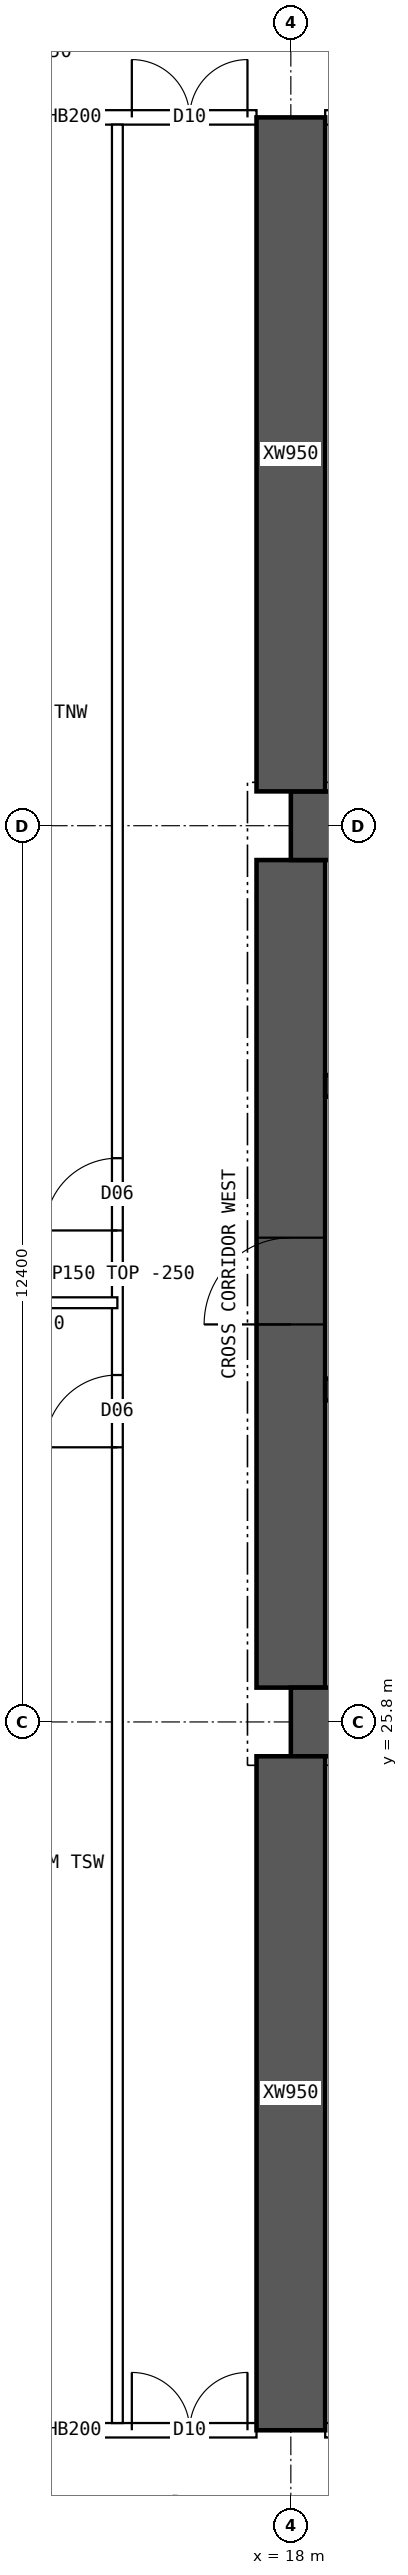
"""IFC4 building model, lengths in metres.
Left out: names, types, materials, properties, quantities, classifications, styles, units other than length and angle.
Written with IfcOpenShell. Run it as: python <this file> out.ifc"""

import sys

from ifc_helpers import new_model, si_unit, direction, frame, frame_2d, origin, place, context, subcontext, project, spatial, rectangle, extrude, element, fill, save


model = new_model("IFC4")
c1 = context("Model", 3, precision=1e-05, world=origin(), true_north=direction((0.0, 1.0)))
c2 = subcontext(c1, "Body", "Model", "MODEL_VIEW")
j1 = project(units=[si_unit("LENGTHUNIT", "METRE"), si_unit("PLANEANGLEUNIT", "RADIAN")], contexts=[c1])
p1 = place(None, origin())
s1 = spatial("IfcSite", under=j1, at=p1, CompositionType="ELEMENT")
p2 = place(p1, origin())
s2 = spatial("IfcBuilding", under=s1, at=p2, CompositionType="ELEMENT")
p3 = place(p2, frame((0.0, 0.0, 118.15)))
s3 = spatial("IfcBuildingStorey", under=s2, at=p3, CompositionType="ELEMENT", Elevation=118.15)
for number, where, z_axis, x_axis in (
    (1, (18.0, 25.8, 0.0), (0.0, 0.0, 1.0), (1.0, 0.0, 0.0)),
    (2, (18.0, 38.2, 0.0), (0.0, 0.0, 1.0), (1.0, 0.0, 0.0)),
):
    element("IfcWall", number, at=place(p3, frame(where, z_axis=z_axis, x_axis=x_axis)), inside=s3, PredefinedType="SHEAR", context=c2, shape_type="SweptSolid", body=[
        extrude(rectangle(XDim=48.0, YDim=0.95, at=frame_2d((24.0, 0.0))), origin(), (0.0, 0.0, 1.0), 3.75),
    ])
p4 = place(p3, frame((18.0, 26.275, 0.0), z_axis=(0.0, 0.0, 1.0), x_axis=(0.0, 1.0, 0.0)))
e3 = element("IfcWall", 3, at=p4, inside=s3, PredefinedType="SHEAR", context=c2, shape_type="SweptSolid", body=[
    extrude(rectangle(XDim=11.45, YDim=0.95, at=frame_2d((5.725, 0.0))), origin(), (0.0, 0.0, 1.0), 3.75),
])
p5 = place(p4, frame((5.025, 0.0, 0.0)))
e4 = element("IfcOpeningElement", 4, at=p5, cuts=e3, PredefinedType="OPENING", context=c2, shape_type="SweptSolid", body=[
    extrude(rectangle(XDim=1.2, YDim=2.1, at=frame_2d((0.6, 1.05))), frame((0.0, 0.485, 0.0), z_axis=(0.0, -1.0, 0.0), x_axis=(1.0, 0.0, 0.0)), (0.0, 0.0, 1.0), 0.97),
])
p6 = place(p3, frame((18.475, 30.4, 0.0), z_axis=(0.0, 0.0, 1.0), x_axis=(1.0, 0.0, 0.0)))
e5 = element("IfcWall", 5, at=p6, inside=s3, PredefinedType="SHEAR", context=c2, shape_type="SweptSolid", body=[
    extrude(rectangle(XDim=47.05, YDim=0.3, at=frame_2d((23.525, 0.0))), origin(), (0.0, 0.0, 1.0), 3.75),
])
p7 = place(p6, frame((0.4, 0.0, 0.0)))
e6 = element("IfcOpeningElement", 6, at=p7, cuts=e5, PredefinedType="OPENING", context=c2, shape_type="SweptSolid", body=[
    extrude(rectangle(XDim=1.0, YDim=2.1, at=frame_2d((0.5, 1.05))), frame((0.0, 0.16, 0.0), z_axis=(0.0, -1.0, 0.0), x_axis=(1.0, 0.0, 0.0)), (0.0, 0.0, 1.0), 0.32),
])
p8 = place(p6, frame((45.65, 0.0, 0.0)))
e7 = element("IfcOpeningElement", 7, at=p8, cuts=e5, PredefinedType="OPENING", context=c2, shape_type="SweptSolid", body=[
    extrude(rectangle(XDim=1.0, YDim=2.1, at=frame_2d((0.5, 1.05))), frame((0.0, 0.16, 0.0), z_axis=(0.0, -1.0, 0.0), x_axis=(1.0, 0.0, 0.0)), (0.0, 0.0, 1.0), 0.32),
])
p9 = place(p6, frame((8.275, 0.0, 0.0)))
e8 = element("IfcOpeningElement", 8, at=p9, cuts=e5, PredefinedType="OPENING", context=c2, shape_type="SweptSolid", body=[
    extrude(rectangle(XDim=1.1, YDim=2.1, at=frame_2d((0.55, 1.05))), frame((0.0, 0.16, 0.0), z_axis=(0.0, -1.0, 0.0), x_axis=(1.0, 0.0, 0.0)), (0.0, 0.0, 1.0), 0.32),
])
p10 = place(p6, frame((10.875, 0.0, 0.0)))
e9 = element("IfcOpeningElement", 9, at=p10, cuts=e5, PredefinedType="OPENING", context=c2, shape_type="SweptSolid", body=[
    extrude(rectangle(XDim=1.1, YDim=2.1, at=frame_2d((0.55, 1.05))), frame((0.0, 0.16, 0.0), z_axis=(0.0, -1.0, 0.0), x_axis=(1.0, 0.0, 0.0)), (0.0, 0.0, 1.0), 0.32),
])
p11 = place(p6, frame((13.475, 0.0, 0.0)))
e10 = element("IfcOpeningElement", 10, at=p11, cuts=e5, PredefinedType="OPENING", context=c2, shape_type="SweptSolid", body=[
    extrude(rectangle(XDim=1.1, YDim=2.1, at=frame_2d((0.55, 1.05))), frame((0.0, 0.16, 0.0), z_axis=(0.0, -1.0, 0.0), x_axis=(1.0, 0.0, 0.0)), (0.0, 0.0, 1.0), 0.32),
])
p12 = place(p6, frame((16.075, 0.0, 0.0)))
e11 = element("IfcOpeningElement", 11, at=p12, cuts=e5, PredefinedType="OPENING", context=c2, shape_type="SweptSolid", body=[
    extrude(rectangle(XDim=1.1, YDim=2.1, at=frame_2d((0.55, 1.05))), frame((0.0, 0.16, 0.0), z_axis=(0.0, -1.0, 0.0), x_axis=(1.0, 0.0, 0.0)), (0.0, 0.0, 1.0), 0.32),
])
p13 = place(p6, frame((18.85, 0.0, 0.0)))
e12 = element("IfcOpeningElement", 12, at=p13, cuts=e5, PredefinedType="OPENING", context=c2, shape_type="SweptSolid", body=[
    extrude(rectangle(XDim=0.9, YDim=2.1, at=frame_2d((0.45, 1.05))), frame((0.0, 0.16, 0.0), z_axis=(0.0, -1.0, 0.0), x_axis=(1.0, 0.0, 0.0)), (0.0, 0.0, 1.0), 0.32),
])
p14 = place(p6, frame((30.142, 0.0, 0.0)))
e13 = element("IfcOpeningElement", 13, at=p14, cuts=e5, PredefinedType="OPENING", context=c2, shape_type="SweptSolid", body=[
    extrude(rectangle(XDim=1.1, YDim=2.1, at=frame_2d((0.55, 1.05))), frame((0.0, 0.16, 0.0), z_axis=(0.0, -1.0, 0.0), x_axis=(1.0, 0.0, 0.0)), (0.0, 0.0, 1.0), 0.32),
])
p15 = place(p6, frame((33.675, 0.0, 0.0)))
e14 = element("IfcOpeningElement", 14, at=p15, cuts=e5, PredefinedType="OPENING", context=c2, shape_type="SweptSolid", body=[
    extrude(rectangle(XDim=1.1, YDim=2.1, at=frame_2d((0.55, 1.05))), frame((0.0, 0.16, 0.0), z_axis=(0.0, -1.0, 0.0), x_axis=(1.0, 0.0, 0.0)), (0.0, 0.0, 1.0), 0.32),
])
p16 = place(p6, frame((37.208, 0.0, 0.0)))
e15 = element("IfcOpeningElement", 15, at=p16, cuts=e5, PredefinedType="OPENING", context=c2, shape_type="SweptSolid", body=[
    extrude(rectangle(XDim=1.1, YDim=2.1, at=frame_2d((0.55, 1.05))), frame((0.0, 0.16, 0.0), z_axis=(0.0, -1.0, 0.0), x_axis=(1.0, 0.0, 0.0)), (0.0, 0.0, 1.0), 0.32),
])
p17 = place(p3, frame((18.475, 34.6, 0.0), z_axis=(0.0, 0.0, 1.0), x_axis=(1.0, 0.0, 0.0)))
e16 = element("IfcWall", 16, at=p17, inside=s3, PredefinedType="SHEAR", context=c2, shape_type="SweptSolid", body=[
    extrude(rectangle(XDim=47.05, YDim=0.3, at=frame_2d((23.525, 0.0))), origin(), (0.0, 0.0, 1.0), 3.75),
])
p18 = place(p17, frame((0.9, 0.0, 0.0)))
e17 = element("IfcOpeningElement", 17, at=p18, cuts=e16, PredefinedType="OPENING", context=c2, shape_type="SweptSolid", body=[
    extrude(rectangle(XDim=1.1, YDim=2.1, at=frame_2d((0.55, 1.05))), frame((0.0, 0.16, 0.0), z_axis=(0.0, -1.0, 0.0), x_axis=(1.0, 0.0, 0.0)), (0.0, 0.0, 1.0), 0.32),
])
p19 = place(p17, frame((45.05, 0.0, 0.0)))
e18 = element("IfcOpeningElement", 18, at=p19, cuts=e16, PredefinedType="OPENING", context=c2, shape_type="SweptSolid", body=[
    extrude(rectangle(XDim=1.1, YDim=2.1, at=frame_2d((0.55, 1.05))), frame((0.0, 0.16, 0.0), z_axis=(0.0, -1.0, 0.0), x_axis=(1.0, 0.0, 0.0)), (0.0, 0.0, 1.0), 0.32),
])
p20 = place(p17, frame((4.125, 0.0, 0.0)))
e19 = element("IfcOpeningElement", 19, at=p20, cuts=e16, PredefinedType="OPENING", context=c2, shape_type="SweptSolid", body=[
    extrude(rectangle(XDim=0.9, YDim=2.1, at=frame_2d((0.45, 1.05))), frame((0.0, 0.16, 0.0), z_axis=(0.0, -1.0, 0.0), x_axis=(1.0, 0.0, 0.0)), (0.0, 0.0, 1.0), 0.32),
])
p21 = place(p17, frame((42.025, 0.0, 0.0)))
e20 = element("IfcOpeningElement", 20, at=p21, cuts=e16, PredefinedType="OPENING", context=c2, shape_type="SweptSolid", body=[
    extrude(rectangle(XDim=0.9, YDim=2.1, at=frame_2d((0.45, 1.05))), frame((0.0, 0.16, 0.0), z_axis=(0.0, -1.0, 0.0), x_axis=(1.0, 0.0, 0.0)), (0.0, 0.0, 1.0), 0.32),
])
p22 = place(p17, frame((8.9, 0.0, 0.0)))
e21 = element("IfcOpeningElement", 21, at=p22, cuts=e16, PredefinedType="OPENING", context=c2, shape_type="SweptSolid", body=[
    extrude(rectangle(XDim=0.9, YDim=2.1, at=frame_2d((0.45, 1.05))), frame((0.0, 0.16, 0.0), z_axis=(0.0, -1.0, 0.0), x_axis=(1.0, 0.0, 0.0)), (0.0, 0.0, 1.0), 0.32),
])
p23 = place(p17, frame((12.874, 0.0, 0.0)))
e22 = element("IfcOpeningElement", 22, at=p23, cuts=e16, PredefinedType="OPENING", context=c2, shape_type="SweptSolid", body=[
    extrude(rectangle(XDim=0.9, YDim=2.1, at=frame_2d((0.45, 1.05))), frame((0.0, 0.16, 0.0), z_axis=(0.0, -1.0, 0.0), x_axis=(1.0, 0.0, 0.0)), (0.0, 0.0, 1.0), 0.32),
])
p24 = place(p17, frame((16.521, 0.0, 0.0)))
e23 = element("IfcOpeningElement", 23, at=p24, cuts=e16, PredefinedType="OPENING", context=c2, shape_type="SweptSolid", body=[
    extrude(rectangle(XDim=0.9, YDim=2.1, at=frame_2d((0.45, 1.05))), frame((0.0, 0.16, 0.0), z_axis=(0.0, -1.0, 0.0), x_axis=(1.0, 0.0, 0.0)), (0.0, 0.0, 1.0), 0.32),
])
p25 = place(p17, frame((20.28, 0.0, 0.0)))
e24 = element("IfcOpeningElement", 24, at=p25, cuts=e16, PredefinedType="OPENING", context=c2, shape_type="SweptSolid", body=[
    extrude(rectangle(XDim=0.9, YDim=2.1, at=frame_2d((0.45, 1.05))), frame((0.0, 0.16, 0.0), z_axis=(0.0, -1.0, 0.0), x_axis=(1.0, 0.0, 0.0)), (0.0, 0.0, 1.0), 0.32),
])
p26 = place(p17, frame((24.686, 0.0, 0.0)))
e25 = element("IfcOpeningElement", 25, at=p26, cuts=e16, PredefinedType="OPENING", context=c2, shape_type="SweptSolid", body=[
    extrude(rectangle(XDim=0.9, YDim=2.1, at=frame_2d((0.45, 1.05))), frame((0.0, 0.16, 0.0), z_axis=(0.0, -1.0, 0.0), x_axis=(1.0, 0.0, 0.0)), (0.0, 0.0, 1.0), 0.32),
])
p27 = place(p17, frame((27.483, 0.0, 0.0)))
e26 = element("IfcOpeningElement", 26, at=p27, cuts=e16, PredefinedType="OPENING", context=c2, shape_type="SweptSolid", body=[
    extrude(rectangle(XDim=0.9, YDim=2.1, at=frame_2d((0.45, 1.05))), frame((0.0, 0.16, 0.0), z_axis=(0.0, -1.0, 0.0), x_axis=(1.0, 0.0, 0.0)), (0.0, 0.0, 1.0), 0.32),
])
p28 = place(p17, frame((29.856, 0.0, 0.0)))
e27 = element("IfcOpeningElement", 27, at=p28, cuts=e16, PredefinedType="OPENING", context=c2, shape_type="SweptSolid", body=[
    extrude(rectangle(XDim=0.9, YDim=2.1, at=frame_2d((0.45, 1.05))), frame((0.0, 0.16, 0.0), z_axis=(0.0, -1.0, 0.0), x_axis=(1.0, 0.0, 0.0)), (0.0, 0.0, 1.0), 0.32),
])
p29 = place(p17, frame((33.706, 0.0, 0.0)))
e28 = element("IfcOpeningElement", 28, at=p29, cuts=e16, PredefinedType="OPENING", context=c2, shape_type="SweptSolid", body=[
    extrude(rectangle(XDim=0.9, YDim=2.1, at=frame_2d((0.45, 1.05))), frame((0.0, 0.16, 0.0), z_axis=(0.0, -1.0, 0.0), x_axis=(1.0, 0.0, 0.0)), (0.0, 0.0, 1.0), 0.32),
])
p30 = place(p17, frame((37.454, 0.0, 0.0)))
e29 = element("IfcOpeningElement", 29, at=p30, cuts=e16, PredefinedType="OPENING", context=c2, shape_type="SweptSolid", body=[
    extrude(rectangle(XDim=0.9, YDim=2.1, at=frame_2d((0.45, 1.05))), frame((0.0, 0.16, 0.0), z_axis=(0.0, -1.0, 0.0), x_axis=(1.0, 0.0, 0.0)), (0.0, 0.0, 1.0), 0.32),
])
for number, where, z_axis, x_axis in (
    (30, (18.0, 16.0, 0.0), (0.0, 0.0, 1.0), (0.0, 1.0, 0.0)),
    (31, (18.0, 38.675, 0.0), (0.0, 0.0, 1.0), (0.0, 1.0, 0.0)),
):
    element("IfcWall", number, at=place(p3, frame(where, z_axis=z_axis, x_axis=x_axis)), inside=s3, PredefinedType="SHEAR", context=c2, shape_type="SweptSolid", body=[
        extrude(rectangle(XDim=9.325, YDim=0.95, at=frame_2d((4.663, 0.0))), origin(), (0.0, 0.0, 1.0), 3.75),
    ])
p31 = place(p3, frame((12.475, 16.0, 0.0), z_axis=(0.0, 0.0, 1.0), x_axis=(1.0, 0.0, 0.0)))
e32 = element("IfcWall", 32, at=p31, inside=s3, PredefinedType="SOLIDWALL", context=c2, shape_type="SweptSolid", body=[
    extrude(rectangle(XDim=5.05, YDim=0.2, at=frame_2d((2.525, 0.0))), origin(), (0.0, 0.0, 1.0), 3.5),
])
p32 = place(p31, frame((3.325, 0.0, 0.0)))
e33 = element("IfcOpeningElement", 33, at=p32, cuts=e32, PredefinedType="OPENING", context=c2, shape_type="SweptSolid", body=[
    extrude(rectangle(XDim=1.6, YDim=2.1, at=frame_2d((0.8, 1.05))), frame((0.0, 0.11, 0.0), z_axis=(0.0, -1.0, 0.0), x_axis=(1.0, 0.0, 0.0)), (0.0, 0.0, 1.0), 0.22),
])
p33 = place(p3, frame((18.475, 16.0, 0.0), z_axis=(0.0, 0.0, 1.0), x_axis=(1.0, 0.0, 0.0)))
e34 = element("IfcWall", 34, at=p33, inside=s3, PredefinedType="SOLIDWALL", context=c2, shape_type="SweptSolid", body=[
    extrude(rectangle(XDim=5.05, YDim=0.2, at=frame_2d((2.525, 0.0))), origin(), (0.0, 0.0, 1.0), 3.5),
])
p34 = place(p33, frame((0.35, 0.0, 0.0)))
e35 = element("IfcOpeningElement", 35, at=p34, cuts=e34, PredefinedType="OPENING", context=c2, shape_type="SweptSolid", body=[
    extrude(rectangle(XDim=0.9, YDim=2.1, at=frame_2d((0.45, 1.05))), frame((0.0, 0.11, 0.0), z_axis=(0.0, -1.0, 0.0), x_axis=(1.0, 0.0, 0.0)), (0.0, 0.0, 1.0), 0.22),
])
p35 = place(p33, frame((3.105, 0.0, 0.0)))
e36 = element("IfcOpeningElement", 36, at=p35, cuts=e34, PredefinedType="OPENING", context=c2, shape_type="SweptSolid", body=[
    extrude(rectangle(XDim=0.9, YDim=2.1, at=frame_2d((0.45, 1.05))), frame((0.0, 0.11, 0.0), z_axis=(0.0, -1.0, 0.0), x_axis=(1.0, 0.0, 0.0)), (0.0, 0.0, 1.0), 0.22),
])
p36 = place(p3, frame((12.475, 48.0, 0.0), z_axis=(0.0, 0.0, 1.0), x_axis=(1.0, 0.0, 0.0)))
e37 = element("IfcWall", 37, at=p36, inside=s3, PredefinedType="SOLIDWALL", context=c2, shape_type="SweptSolid", body=[
    extrude(rectangle(XDim=5.05, YDim=0.2, at=frame_2d((2.525, 0.0))), origin(), (0.0, 0.0, 1.0), 3.5),
])
p37 = place(p36, frame((3.325, 0.0, 0.0)))
e38 = element("IfcOpeningElement", 38, at=p37, cuts=e37, PredefinedType="OPENING", context=c2, shape_type="SweptSolid", body=[
    extrude(rectangle(XDim=1.6, YDim=2.1, at=frame_2d((0.8, 1.05))), frame((0.0, 0.11, 0.0), z_axis=(0.0, -1.0, 0.0), x_axis=(1.0, 0.0, 0.0)), (0.0, 0.0, 1.0), 0.22),
])
p38 = place(p3, frame((18.475, 48.0, 0.0), z_axis=(0.0, 0.0, 1.0), x_axis=(1.0, 0.0, 0.0)))
e39 = element("IfcWall", 39, at=p38, inside=s3, PredefinedType="SOLIDWALL", context=c2, shape_type="SweptSolid", body=[
    extrude(rectangle(XDim=5.05, YDim=0.2, at=frame_2d((2.525, 0.0))), origin(), (0.0, 0.0, 1.0), 3.5),
])
p39 = place(p38, frame((0.35, 0.0, 0.0)))
e40 = element("IfcOpeningElement", 40, at=p39, cuts=e39, PredefinedType="OPENING", context=c2, shape_type="SweptSolid", body=[
    extrude(rectangle(XDim=0.9, YDim=2.1, at=frame_2d((0.45, 1.05))), frame((0.0, 0.11, 0.0), z_axis=(0.0, -1.0, 0.0), x_axis=(1.0, 0.0, 0.0)), (0.0, 0.0, 1.0), 0.22),
])
p40 = place(p38, frame((2.735, 0.0, 0.0)))
e41 = element("IfcOpeningElement", 41, at=p40, cuts=e39, PredefinedType="OPENING", context=c2, shape_type="SweptSolid", body=[
    extrude(rectangle(XDim=0.9, YDim=2.1, at=frame_2d((0.45, 1.05))), frame((0.0, 0.11, 0.0), z_axis=(0.0, -1.0, 0.0), x_axis=(1.0, 0.0, 0.0)), (0.0, 0.0, 1.0), 0.22),
])
p41 = place(p3, frame((15.6, 16.1, 0.0), z_axis=(0.0, 0.0, 1.0), x_axis=(0.0, 1.0, 0.0)))
e42 = element("IfcWall", 42, at=p41, inside=s3, PredefinedType="PARTITIONING", context=c2, shape_type="SweptSolid", body=[
    extrude(rectangle(XDim=31.8, YDim=0.15, at=frame_2d((15.9, 0.0))), origin(), (0.0, 0.0, 1.0), 3.5),
])
p42 = place(p41, frame((13.5, 0.0, 0.0)))
e43 = element("IfcOpeningElement", 43, at=p42, cuts=e42, PredefinedType="OPENING", context=c2, shape_type="SweptSolid", body=[
    extrude(rectangle(XDim=1.0, YDim=2.1, at=frame_2d((0.5, 1.05))), frame((0.0, 0.085, 0.0), z_axis=(0.0, -1.0, 0.0), x_axis=(1.0, 0.0, 0.0)), (0.0, 0.0, 1.0), 0.17),
])
p43 = place(p41, frame((16.5, 0.0, 0.0)))
e44 = element("IfcOpeningElement", 44, at=p43, cuts=e42, PredefinedType="OPENING", context=c2, shape_type="SweptSolid", body=[
    extrude(rectangle(XDim=1.0, YDim=2.1, at=frame_2d((0.5, 1.05))), frame((0.0, 0.085, 0.0), z_axis=(0.0, -1.0, 0.0), x_axis=(1.0, 0.0, 0.0)), (0.0, 0.0, 1.0), 0.17),
])
p44 = place(p3, frame((12.0, 31.6, 0.0), z_axis=(0.0, 0.0, 1.0), x_axis=(1.0, 0.0, 0.0)))
e45 = element("IfcWall", 45, at=p44, inside=s3, PredefinedType="PARTITIONING", context=c2, shape_type="SweptSolid", body=[
    extrude(rectangle(XDim=3.6, YDim=0.15, at=frame_2d((1.8, 0.0))), origin(), (0.0, 0.0, 1.0), 3.5),
])
p45 = place(p5, origin())
e46 = element("IfcDoor", 46, at=p45, inside=s3, OperationType="SINGLE_SWING_LEFT", PredefinedType="DOOR", context=c2, shape_type="SweptSolid", body=[
    extrude(rectangle(XDim=1.2, YDim=2.1, at=frame_2d((0.6, 1.05))), frame((0.0, 0.025, 0.0), z_axis=(0.0, -1.0, 0.0), x_axis=(1.0, 0.0, 0.0)), (0.0, 0.0, 1.0), 0.05),
])
fill(e4, e46)
p46 = place(p32, origin())
e47 = element("IfcDoor", 47, at=p46, inside=s3, OperationType="DOUBLE_DOOR_SINGLE_SWING", PredefinedType="DOOR", context=c2, shape_type="SweptSolid", body=[
    extrude(rectangle(XDim=1.6, YDim=2.1, at=frame_2d((0.8, 1.05))), frame((0.0, 0.025, 0.0), z_axis=(0.0, -1.0, 0.0), x_axis=(1.0, 0.0, 0.0)), (0.0, 0.0, 1.0), 0.05),
])
fill(e33, e47)
p47 = place(p37, origin())
e48 = element("IfcDoor", 48, at=p47, inside=s3, OperationType="DOUBLE_DOOR_SINGLE_SWING", PredefinedType="DOOR", context=c2, shape_type="SweptSolid", body=[
    extrude(rectangle(XDim=1.6, YDim=2.1, at=frame_2d((0.8, 1.05))), frame((0.0, 0.025, 0.0), z_axis=(0.0, -1.0, 0.0), x_axis=(1.0, 0.0, 0.0)), (0.0, 0.0, 1.0), 0.05),
])
fill(e38, e48)
p48 = place(p42, origin())
e49 = element("IfcDoor", 49, at=p48, inside=s3, OperationType="SINGLE_SWING_LEFT", PredefinedType="DOOR", context=c2, shape_type="SweptSolid", body=[
    extrude(rectangle(XDim=1.0, YDim=2.1, at=frame_2d((0.5, 1.05))), frame((0.0, 0.025, 0.0), z_axis=(0.0, -1.0, 0.0), x_axis=(1.0, 0.0, 0.0)), (0.0, 0.0, 1.0), 0.05),
])
fill(e43, e49)
p49 = place(p43, origin())
e50 = element("IfcDoor", 50, at=p49, inside=s3, OperationType="SINGLE_SWING_LEFT", PredefinedType="DOOR", context=c2, shape_type="SweptSolid", body=[
    extrude(rectangle(XDim=1.0, YDim=2.1, at=frame_2d((0.5, 1.05))), frame((0.0, 0.025, 0.0), z_axis=(0.0, -1.0, 0.0), x_axis=(1.0, 0.0, 0.0)), (0.0, 0.0, 1.0), 0.05),
])
fill(e44, e50)
save(model, sys.argv[1])
